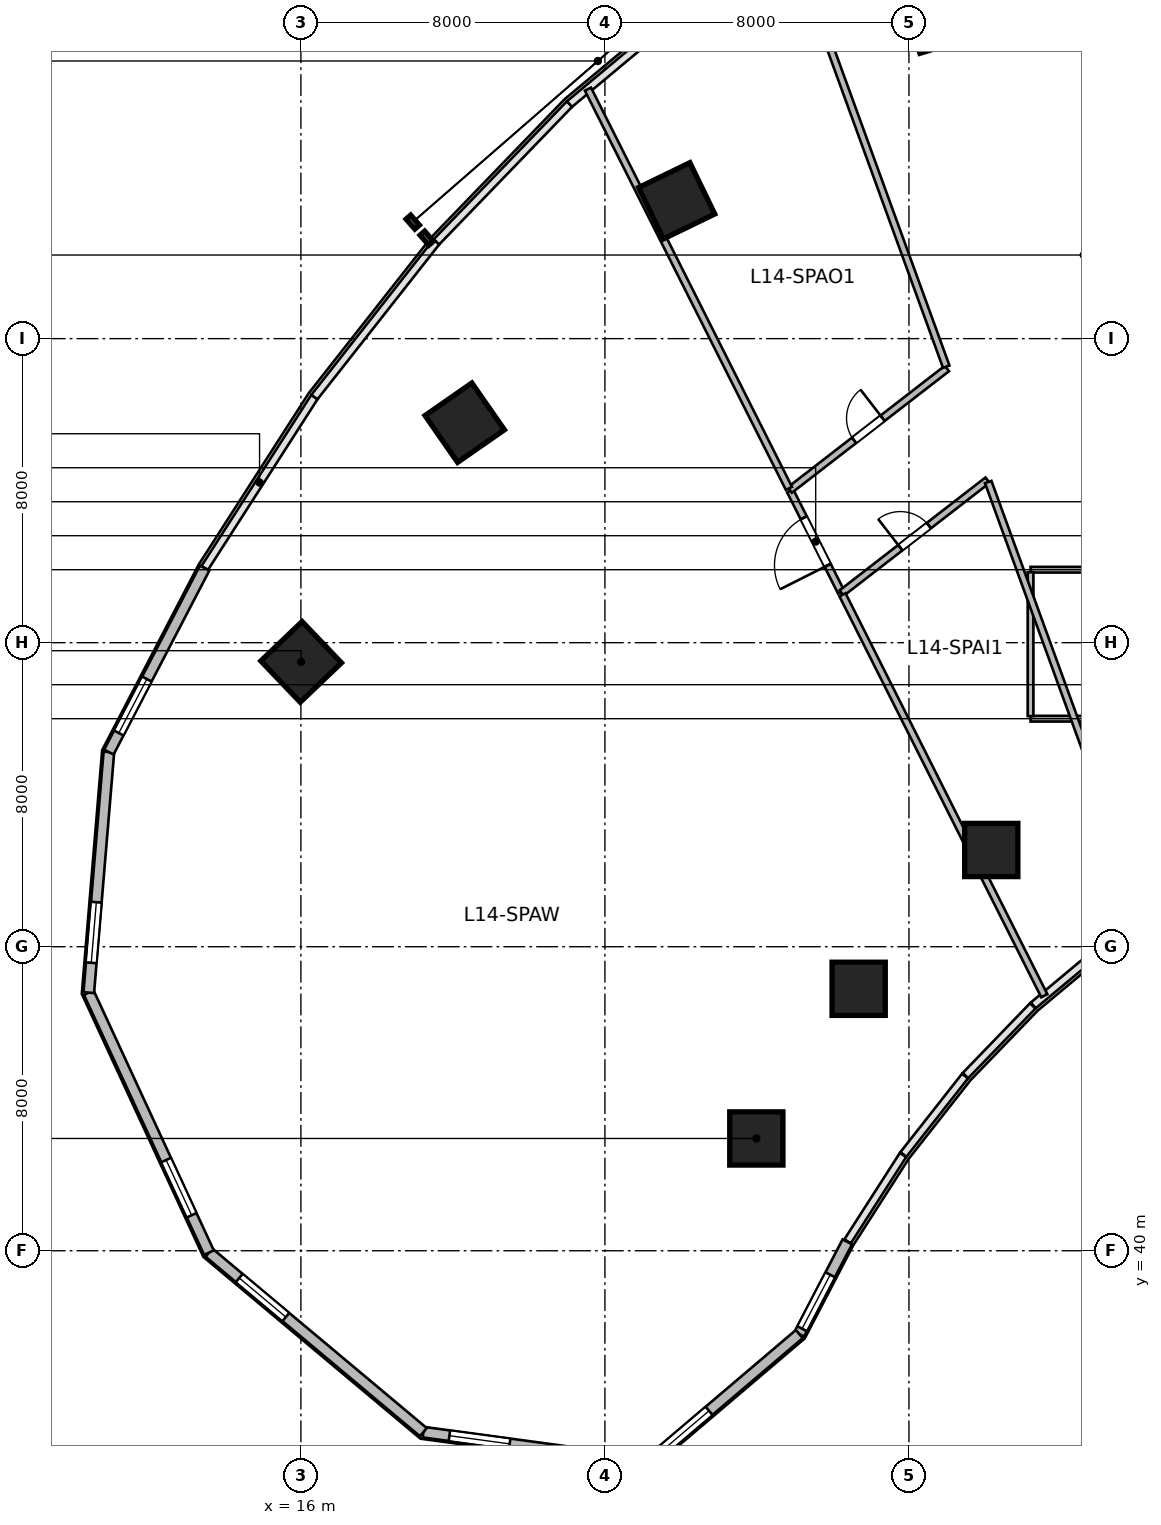
"""IFC4 building model, lengths in metres.
Left out: names, types, materials, properties, quantities, classifications, styles, units other than length and angle.
Written with IfcOpenShell. Run it as: python <this file> out.ifc"""

import sys

from ifc_helpers import new_model, si_unit, direction, frame, frame_2d, origin, origin_2d, place, context, subcontext, project, spatial, rectangle, circle, extrude, source, transform, mapped, element, fill, save


model = new_model("IFC4")
c1 = context("Model", 3, precision=1e-05, world=origin(), true_north=direction((0.0, 1.0)))
c2 = subcontext(c1, "Body", "Model", "MODEL_VIEW")
j1 = project(units=[si_unit("LENGTHUNIT", "METRE"), si_unit("PLANEANGLEUNIT", "RADIAN")], contexts=[c1])
p1 = place(None, origin())
s1 = spatial("IfcSite", under=j1, at=p1, CompositionType="ELEMENT")
p2 = place(p1, origin())
s2 = spatial("IfcBuilding", under=s1, at=p2, CompositionType="ELEMENT")
p3 = place(p2, frame((0.0, 0.0, 64.2)))
s3 = spatial("IfcBuildingStorey", under=s2, at=p3, CompositionType="ELEMENT", Elevation=64.2)
m1 = source(origin(), c2, "Body", "SweptSolid", [
    extrude(circle(Radius=0.7, at=origin_2d()), origin(), (0.0, 0.0, 1.0), 3.6),
])
p4 = place(p3, frame((27.985, 42.955, 0.0), z_axis=(0.0, 0.0, 1.0), x_axis=(-0.690756218984, 0.723087716626, 0.0)))
e1 = element("IfcColumn", 1, at=p4, inside=s3, PredefinedType="COLUMN", context=c2, shape_type="MappedRepresentation", body=[
    mapped(m1, transform((0.0, 0.0, 0.0), scale=1.0)),
])
m2 = source(origin(), c2, "Body", "SweptSolid", [
    extrude(rectangle(XDim=1.5, YDim=1.5, at=origin_2d()), origin(), (0.0, 0.0, 1.0), 3.6),
])
p5 = place(p3, frame((16.007, 55.494, 0.0), z_axis=(0.0, 0.0, 1.0), x_axis=(-0.690756218984, 0.723087716626, 0.0)))
e2 = element("IfcColumn", 2, at=p5, inside=s3, PredefinedType="COLUMN", context=c2, shape_type="MappedRepresentation", body=[
    mapped(m2, transform((0.0, 0.0, 0.0), scale=1.0)),
])
p6 = place(p3, frame((30.677, 46.892, 0.0), z_axis=(0.0, 0.0, 1.0), x_axis=(-0.571143442153, 0.820850271661, 0.0)))
e3 = element("IfcColumn", 3, at=p6, inside=s3, PredefinedType="COLUMN", context=c2, shape_type="MappedRepresentation", body=[
    mapped(m1, transform((0.0, 0.0, 0.0), scale=1.0)),
])
p7 = place(p3, frame((20.311, 61.789, 0.0), z_axis=(0.0, 0.0, 1.0), x_axis=(-0.571143442153, 0.820850271661, 0.0)))
e4 = element("IfcColumn", 4, at=p7, inside=s3, PredefinedType="COLUMN", context=c2, shape_type="MappedRepresentation", body=[
    mapped(m2, transform((0.0, 0.0, 0.0), scale=1.0)),
])
p8 = place(p3, frame((34.166, 50.545, 0.0), z_axis=(0.0, 0.0, 1.0), x_axis=(-0.436173672171, 0.899862504889, 0.0)))
e5 = element("IfcColumn", 5, at=p8, inside=s3, PredefinedType="COLUMN", context=c2, shape_type="MappedRepresentation", body=[
    mapped(m1, transform((0.0, 0.0, 0.0), scale=1.0)),
])
for number, where, z_axis, x_axis in (
    (6, (25.888, 67.627, 0.0), (0.0, 0.0, 1.0), (-0.436, 0.9, 0.0)),
    (7, (32.791, 72.442, 0.0), (0.0, 0.0, 1.0), (-0.289, 0.957, 0.0)),
):
    element("IfcColumn", number, at=place(p3, frame(where, z_axis=z_axis, x_axis=x_axis)), inside=s3, PredefinedType="COLUMN", context=c2, shape_type="MappedRepresentation", body=[
        mapped(m2, transform((0.0, 0.0, 0.0), scale=1.0)),
    ])
m3 = source(origin(), c2, "Body", "SweptSolid", [
    extrude(rectangle(XDim=2.735, YDim=0.28, at=frame_2d((1.368, 0.0))), origin(), (0.0, 0.0, 1.0), 3.36),
])
p9 = place(p3, frame((30.378, 40.234, 0.0), z_axis=(0.0, 0.0, 1.0), x_axis=(-0.46179107292, -0.886988728774, 0.0)))
e8 = element("IfcWall", 8, at=p9, inside=s3, PredefinedType="SOLIDWALL", context=c2, shape_type="MappedRepresentation", body=[
    mapped(m3, transform((0.0, 0.0, 0.0), scale=1.0)),
])
p10 = place(p9, frame((0.976, 0.0, 0.95)))
e9 = element("IfcOpeningElement", 9, at=p10, cuts=e8, PredefinedType="OPENING", context=c2, shape_type="SweptSolid", body=[
    extrude(rectangle(XDim=1.6, YDim=1.9, at=frame_2d((0.8, 0.95))), frame((0.0, 0.15, 0.0), z_axis=(0.0, -1.0, 0.0), x_axis=(1.0, 0.0, 0.0)), (0.0, 0.0, 1.0), 0.3),
])
m4 = source(origin(), c2, "Body", "SweptSolid", [
    extrude(rectangle(XDim=5.222, YDim=0.28, at=frame_2d((2.611, 0.0))), origin(), (0.0, 0.0, 1.0), 3.36),
])
p11 = place(p3, frame((29.115, 37.807, 0.0), z_axis=(0.0, 0.0, 1.0), x_axis=(-0.761900099546, -0.647694556339, 0.0)))
e10 = element("IfcWall", 10, at=p11, inside=s3, PredefinedType="SOLIDWALL", context=c2, shape_type="MappedRepresentation", body=[
    mapped(m4, transform((0.0, 0.0, 0.0), scale=1.0)),
])
p12 = place(p11, frame((3.117, 0.0, 0.95)))
e11 = element("IfcOpeningElement", 11, at=p12, cuts=e10, PredefinedType="OPENING", context=c2, shape_type="SweptSolid", body=[
    extrude(rectangle(XDim=1.6, YDim=1.9, at=frame_2d((0.8, 0.95))), frame((0.0, 0.15, 0.0), z_axis=(0.0, -1.0, 0.0), x_axis=(1.0, 0.0, 0.0)), (0.0, 0.0, 1.0), 0.3),
])
m5 = source(origin(), c2, "Body", "SweptSolid", [
    extrude(rectangle(XDim=5.967, YDim=0.28, at=frame_2d((2.984, 0.0))), origin(), (0.0, 0.0, 1.0), 3.36),
])
p13 = place(p3, frame((25.136, 34.425, 0.0), z_axis=(0.0, 0.0, 1.0), x_axis=(-0.990927009341, 0.134401124099, 0.0)))
e12 = element("IfcWall", 12, at=p13, inside=s3, PredefinedType="SOLIDWALL", context=c2, shape_type="MappedRepresentation", body=[
    mapped(m5, transform((0.0, 0.0, 0.0), scale=1.0)),
])
p14 = place(p13, frame((3.676, 0.0, 0.95)))
e13 = element("IfcOpeningElement", 13, at=p14, cuts=e12, PredefinedType="OPENING", context=c2, shape_type="SweptSolid", body=[
    extrude(rectangle(XDim=1.6, YDim=1.9, at=frame_2d((0.8, 0.95))), frame((0.0, 0.15, 0.0), z_axis=(0.0, -1.0, 0.0), x_axis=(1.0, 0.0, 0.0)), (0.0, 0.0, 1.0), 0.3),
])
m6 = source(origin(), c2, "Body", "SweptSolid", [
    extrude(rectangle(XDim=7.359, YDim=0.28, at=frame_2d((3.679, 0.0))), origin(), (0.0, 0.0, 1.0), 3.36),
])
p15 = place(p3, frame((19.223, 35.227, 0.0), z_axis=(0.0, 0.0, 1.0), x_axis=(-0.766737165543, 0.641961150675, 0.0)))
e14 = element("IfcWall", 14, at=p15, inside=s3, PredefinedType="SOLIDWALL", context=c2, shape_type="MappedRepresentation", body=[
    mapped(m6, transform((0.0, 0.0, 0.0), scale=1.0)),
])
p16 = place(p15, frame((4.719, 0.0, 0.95)))
e15 = element("IfcOpeningElement", 15, at=p16, cuts=e14, PredefinedType="OPENING", context=c2, shape_type="SweptSolid", body=[
    extrude(rectangle(XDim=1.6, YDim=1.9, at=frame_2d((0.8, 0.95))), frame((0.0, 0.15, 0.0), z_axis=(0.0, -1.0, 0.0), x_axis=(1.0, 0.0, 0.0)), (0.0, 0.0, 1.0), 0.3),
])
m7 = source(origin(), c2, "Body", "SweptSolid", [
    extrude(rectangle(XDim=7.536, YDim=0.28, at=frame_2d((3.768, 0.0))), origin(), (0.0, 0.0, 1.0), 3.36),
])
p17 = place(p3, frame((13.58, 39.951, 0.0), z_axis=(0.0, 0.0, 1.0), x_axis=(-0.41964973873, 0.907686122393, 0.0)))
e16 = element("IfcWall", 16, at=p17, inside=s3, PredefinedType="SOLIDWALL", context=c2, shape_type="MappedRepresentation", body=[
    mapped(m7, transform((0.0, 0.0, 0.0), scale=1.0)),
])
p18 = place(p17, frame((1.084, 0.0, 0.95)))
e17 = element("IfcOpeningElement", 17, at=p18, cuts=e16, PredefinedType="OPENING", context=c2, shape_type="SweptSolid", body=[
    extrude(rectangle(XDim=1.6, YDim=1.9, at=frame_2d((0.8, 0.95))), frame((0.0, 0.15, 0.0), z_axis=(0.0, -1.0, 0.0), x_axis=(1.0, 0.0, 0.0)), (0.0, 0.0, 1.0), 0.3),
])
m8 = source(origin(), c2, "Body", "SweptSolid", [
    extrude(rectangle(XDim=6.353, YDim=0.28, at=frame_2d((3.176, 0.0))), origin(), (0.0, 0.0, 1.0), 3.36),
])
p19 = place(p3, frame((10.418, 46.792, 0.0), z_axis=(0.0, 0.0, 1.0), x_axis=(0.083319001377, 0.996522926986, 0.0)))
e18 = element("IfcWall", 18, at=p19, inside=s3, PredefinedType="SOLIDWALL", context=c2, shape_type="MappedRepresentation", body=[
    mapped(m8, transform((0.0, 0.0, 0.0), scale=1.0)),
])
p20 = place(p19, frame((0.788, 0.0, 0.95)))
e19 = element("IfcOpeningElement", 19, at=p20, cuts=e18, PredefinedType="OPENING", context=c2, shape_type="SweptSolid", body=[
    extrude(rectangle(XDim=1.6, YDim=1.9, at=frame_2d((0.8, 0.95))), frame((0.0, 0.15, 0.0), z_axis=(0.0, -1.0, 0.0), x_axis=(1.0, 0.0, 0.0)), (0.0, 0.0, 1.0), 0.3),
])
m9 = source(origin(), c2, "Body", "SweptSolid", [
    extrude(rectangle(XDim=5.459, YDim=0.28, at=frame_2d((2.73, 0.0))), origin(), (0.0, 0.0, 1.0), 3.36),
])
p21 = place(p3, frame((10.947, 53.122, 0.0), z_axis=(0.0, 0.0, 1.0), x_axis=(0.461768054321, 0.887000712518, 0.0)))
e20 = element("IfcWall", 20, at=p21, inside=s3, PredefinedType="SOLIDWALL", context=c2, shape_type="MappedRepresentation", body=[
    mapped(m9, transform((0.0, 0.0, 0.0), scale=1.0)),
])
p22 = place(p21, frame((0.565, 0.0, 0.95)))
e21 = element("IfcOpeningElement", 21, at=p22, cuts=e20, PredefinedType="OPENING", context=c2, shape_type="SweptSolid", body=[
    extrude(rectangle(XDim=1.6, YDim=1.9, at=frame_2d((0.8, 0.95))), frame((0.0, 0.15, 0.0), z_axis=(0.0, -1.0, 0.0), x_axis=(1.0, 0.0, 0.0)), (0.0, 0.0, 1.0), 0.3),
])
m10 = source(origin(), c2, "Body", "SweptSolid", [
    extrude(rectangle(XDim=6.6, YDim=0.15, at=frame_2d((3.3, 0.0))), origin(), (0.0, 0.0, 1.0), 2.803),
])
p23 = place(p3, frame((35.2, 54.0, 0.0), z_axis=(0.0, 0.0, 1.0), x_axis=(1.0, 0.0, 0.0)))
e22 = element("IfcWall", 22, at=p23, inside=s3, PredefinedType="PARTITIONING", context=c2, shape_type="MappedRepresentation", body=[
    mapped(m10, transform((0.0, 0.0, 0.0), scale=1.0)),
])
m11 = source(origin(), c2, "Body", "SweptSolid", [
    extrude(rectangle(XDim=6.6, YDim=0.15, at=frame_2d((3.3, 0.0))), origin(), (0.0, 0.0, 1.0), 3.36),
])
p24 = place(p3, frame((35.2, 57.92, 0.0), z_axis=(0.0, 0.0, 1.0), x_axis=(1.0, 0.0, 0.0)))
e23 = element("IfcWall", 23, at=p24, inside=s3, PredefinedType="PARTITIONING", context=c2, shape_type="MappedRepresentation", body=[
    mapped(m11, transform((0.0, 0.0, 0.0), scale=1.0)),
])
p25 = place(p24, frame((2.85, 0.0, 0.0)))
e24 = element("IfcOpeningElement", 24, at=p25, cuts=e23, PredefinedType="OPENING", context=c2, shape_type="SweptSolid", body=[
    extrude(rectangle(XDim=0.9, YDim=2.1, at=frame_2d((0.45, 1.05))), frame((0.0, 0.085, 0.0), z_axis=(0.0, -1.0, 0.0), x_axis=(1.0, 0.0, 0.0)), (0.0, 0.0, 1.0), 0.17),
])
m12 = source(origin(), c2, "Body", "SweptSolid", [
    extrude(rectangle(XDim=3.785, YDim=0.15, at=frame_2d((1.893, 0.0))), origin(), (0.0, 0.0, 1.0), 3.36),
])
p26 = place(p3, frame((35.2, 54.067, 0.0), z_axis=(0.0, 0.0, 1.0), x_axis=(0.0, 1.0, 0.0)))
e25 = element("IfcWall", 25, at=p26, inside=s3, PredefinedType="PARTITIONING", context=c2, shape_type="MappedRepresentation", body=[
    mapped(m12, transform((0.0, 0.0, 0.0), scale=1.0)),
])
m13 = source(origin(), c2, "Body", "SweptSolid", [
    extrude(rectangle(XDim=2.985, YDim=0.18, at=frame_2d((1.493, 0.0))), origin(), (0.0, 0.0, 1.0), 3.36),
])
p27 = place(p3, frame((30.218, 57.327, 0.0), z_axis=(0.0, 0.0, 1.0), x_axis=(-0.449665526069, 0.893197018952, 0.0)))
e26 = element("IfcWall", 26, at=p27, inside=s3, PredefinedType="PLUMBINGWALL", context=c2, shape_type="MappedRepresentation", body=[
    mapped(m13, transform((0.0, 0.0, 0.0), scale=1.0)),
])
p28 = place(p27, frame((0.792, 0.0, 0.0)))
e27 = element("IfcOpeningElement", 27, at=p28, cuts=e26, PredefinedType="OPENING", context=c2, shape_type="SweptSolid", body=[
    extrude(rectangle(XDim=1.4, YDim=2.15, at=frame_2d((0.7, 1.075))), frame((0.0, 0.1, 0.0), z_axis=(0.0, -1.0, 0.0), x_axis=(1.0, 0.0, 0.0)), (0.0, 0.0, 1.0), 0.2),
])
m14 = source(origin(), c2, "Body", "SweptSolid", [
    extrude(rectangle(XDim=5.227, YDim=0.18, at=frame_2d((2.614, 0.0))), origin(), (0.0, 0.0, 1.0), 3.36),
])
p29 = place(p3, frame((28.865, 60.015, 0.0), z_axis=(0.0, 0.0, 1.0), x_axis=(0.790908912792, 0.61193389485, 0.0)))
e28 = element("IfcWall", 28, at=p29, inside=s3, PredefinedType="PLUMBINGWALL", context=c2, shape_type="MappedRepresentation", body=[
    mapped(m14, transform((0.0, 0.0, 0.0), scale=1.0)),
])
p30 = place(p29, frame((2.139, 0.0, 0.0)))
e29 = element("IfcOpeningElement", 29, at=p30, cuts=e28, PredefinedType="OPENING", context=c2, shape_type="SweptSolid", body=[
    extrude(rectangle(XDim=0.95, YDim=2.1, at=frame_2d((0.475, 1.05))), frame((0.0, 0.1, 0.0), z_axis=(0.0, -1.0, 0.0), x_axis=(1.0, 0.0, 0.0)), (0.0, 0.0, 1.0), 0.2),
])
m15 = source(origin(), c2, "Body", "SweptSolid", [
    extrude(rectangle(XDim=11.761, YDim=0.18, at=frame_2d((5.88, 0.0))), origin(), (0.0, 0.0, 1.0), 3.36),
])
p31 = place(p3, frame((28.842, 60.06, 0.0), z_axis=(0.0, 0.0, 1.0), x_axis=(-0.449611686329, 0.893224121661, 0.0)))
e30 = element("IfcWall", 30, at=p31, inside=s3, PredefinedType="PLUMBINGWALL", context=c2, shape_type="MappedRepresentation", body=[
    mapped(m15, transform((0.0, 0.0, 0.0), scale=1.0)),
])
m16 = source(origin(), c2, "Body", "SweptSolid", [
    extrude(rectangle(XDim=12.088, YDim=0.18, at=frame_2d((6.044, 0.0))), origin(), (0.0, 0.0, 1.0), 3.36),
])
p32 = place(p3, frame((32.981, 63.262, 0.0), z_axis=(0.0, 0.0, 1.0), x_axis=(-0.34203007529, 0.939689005787, 0.0)))
e31 = element("IfcWall", 31, at=p32, inside=s3, PredefinedType="PLUMBINGWALL", context=c2, shape_type="MappedRepresentation", body=[
    mapped(m16, transform((0.0, 0.0, 0.0), scale=1.0)),
])
m17 = source(origin(), c2, "Body", "SweptSolid", [
    extrude(rectangle(XDim=4.855, YDim=0.18, at=frame_2d((2.427, 0.0))), origin(), (0.0, 0.0, 1.0), 3.36),
])
p33 = place(p3, frame((30.229, 57.305, 0.0), z_axis=(0.0, 0.0, 1.0), x_axis=(0.790930965655, 0.611905391028, 0.0)))
e32 = element("IfcWall", 32, at=p33, inside=s3, PredefinedType="PLUMBINGWALL", context=c2, shape_type="MappedRepresentation", body=[
    mapped(m17, transform((0.0, 0.0, 0.0), scale=1.0)),
])
p34 = place(p33, frame((1.952, 0.0, 0.0)))
e33 = element("IfcOpeningElement", 33, at=p34, cuts=e32, PredefinedType="OPENING", context=c2, shape_type="SweptSolid", body=[
    extrude(rectangle(XDim=0.95, YDim=2.1, at=frame_2d((0.475, 1.05))), frame((0.0, 0.1, 0.0), z_axis=(0.0, -1.0, 0.0), x_axis=(1.0, 0.0, 0.0)), (0.0, 0.0, 1.0), 0.2),
])
m18 = source(origin(), c2, "Body", "SweptSolid", [
    extrude(rectangle(XDim=11.811, YDim=0.18, at=frame_2d((5.906, 0.0))), origin(), (0.0, 0.0, 1.0), 3.36),
])
p35 = place(p3, frame((35.562, 46.71, 0.0), z_axis=(0.0, 0.0, 1.0), x_axis=(-0.449626289102, 0.893216771086, 0.0)))
e34 = element("IfcWall", 34, at=p35, inside=s3, PredefinedType="PLUMBINGWALL", context=c2, shape_type="MappedRepresentation", body=[
    mapped(m18, transform((0.0, 0.0, 0.0), scale=1.0)),
])
m19 = source(origin(), c2, "Body", "SweptSolid", [
    extrude(rectangle(XDim=12.196, YDim=0.18, at=frame_2d((6.098, 0.0))), origin(), (0.0, 0.0, 1.0), 3.36),
])
p36 = place(p3, frame((38.258, 48.766, 0.0), z_axis=(0.0, 0.0, 1.0), x_axis=(-0.342022711534, 0.939691686031, 0.0)))
e35 = element("IfcWall", 35, at=p36, inside=s3, PredefinedType="PLUMBINGWALL", context=c2, shape_type="MappedRepresentation", body=[
    mapped(m19, transform((0.0, 0.0, 0.0), scale=1.0)),
])
m20 = source(origin(), c2, "Body", "SweptSolid", [
    extrude(rectangle(XDim=1.6, YDim=1.9, at=frame_2d((0.8, 0.95))), frame((0.0, 0.03, 0.0), z_axis=(0.0, -1.0, 0.0), x_axis=(1.0, 0.0, 0.0)), (0.0, 0.0, 1.0), 0.06),
])
p37 = place(p10, origin())
e36 = element("IfcWindow", 36, at=p37, inside=s3, PartitioningType="SINGLE_PANEL", PredefinedType="WINDOW", context=c2, shape_type="MappedRepresentation", body=[
    mapped(m20, transform((0.0, 0.0, 0.0), scale=1.0)),
])
fill(e9, e36)
p38 = place(p12, origin())
e37 = element("IfcWindow", 37, at=p38, inside=s3, PartitioningType="SINGLE_PANEL", PredefinedType="WINDOW", context=c2, shape_type="MappedRepresentation", body=[
    mapped(m20, transform((0.0, 0.0, 0.0), scale=1.0)),
])
fill(e11, e37)
p39 = place(p14, origin())
e38 = element("IfcWindow", 38, at=p39, inside=s3, PartitioningType="SINGLE_PANEL", PredefinedType="WINDOW", context=c2, shape_type="MappedRepresentation", body=[
    mapped(m20, transform((0.0, 0.0, 0.0), scale=1.0)),
])
fill(e13, e38)
p40 = place(p16, origin())
e39 = element("IfcWindow", 39, at=p40, inside=s3, PartitioningType="SINGLE_PANEL", PredefinedType="WINDOW", context=c2, shape_type="MappedRepresentation", body=[
    mapped(m20, transform((0.0, 0.0, 0.0), scale=1.0)),
])
fill(e15, e39)
p41 = place(p18, origin())
e40 = element("IfcWindow", 40, at=p41, inside=s3, PartitioningType="SINGLE_PANEL", PredefinedType="WINDOW", context=c2, shape_type="MappedRepresentation", body=[
    mapped(m20, transform((0.0, 0.0, 0.0), scale=1.0)),
])
fill(e17, e40)
p42 = place(p20, origin())
e41 = element("IfcWindow", 41, at=p42, inside=s3, PartitioningType="SINGLE_PANEL", PredefinedType="WINDOW", context=c2, shape_type="MappedRepresentation", body=[
    mapped(m20, transform((0.0, 0.0, 0.0), scale=1.0)),
])
fill(e19, e41)
p43 = place(p22, origin())
e42 = element("IfcWindow", 42, at=p43, inside=s3, PartitioningType="SINGLE_PANEL", PredefinedType="WINDOW", context=c2, shape_type="MappedRepresentation", body=[
    mapped(m20, transform((0.0, 0.0, 0.0), scale=1.0)),
])
fill(e21, e42)
m21 = source(origin(), c2, "Body", "SweptSolid", [
    extrude(rectangle(XDim=1.4, YDim=2.15, at=frame_2d((0.7, 1.075))), frame((0.0, 0.025, 0.0), z_axis=(0.0, -1.0, 0.0), x_axis=(1.0, 0.0, 0.0)), (0.0, 0.0, 1.0), 0.05),
])
p44 = place(p28, origin())
e43 = element("IfcDoor", 43, at=p44, inside=s3, OperationType="SINGLE_SWING_LEFT", PredefinedType="DOOR", context=c2, shape_type="MappedRepresentation", body=[
    mapped(m21, transform((0.0, 0.0, 0.0), scale=1.0)),
])
fill(e27, e43)
m22 = source(origin(), c2, "Body", "SweptSolid", [
    extrude(rectangle(XDim=0.95, YDim=2.1, at=frame_2d((0.475, 1.05))), frame((0.0, 0.025, 0.0), z_axis=(0.0, -1.0, 0.0), x_axis=(1.0, 0.0, 0.0)), (0.0, 0.0, 1.0), 0.05),
])
p45 = place(p30, origin())
e44 = element("IfcDoor", 44, at=p45, inside=s3, OperationType="SINGLE_SWING_RIGHT", PredefinedType="DOOR", context=c2, shape_type="MappedRepresentation", body=[
    mapped(m22, transform((0.0, 0.0, 0.0), scale=1.0)),
])
fill(e29, e44)
p46 = place(p34, origin())
e45 = element("IfcDoor", 45, at=p46, inside=s3, OperationType="SINGLE_SWING_LEFT", PredefinedType="DOOR", context=c2, shape_type="MappedRepresentation", body=[
    mapped(m22, transform((0.0, 0.0, 0.0), scale=1.0)),
])
fill(e33, e45)
save(model, sys.argv[1])
